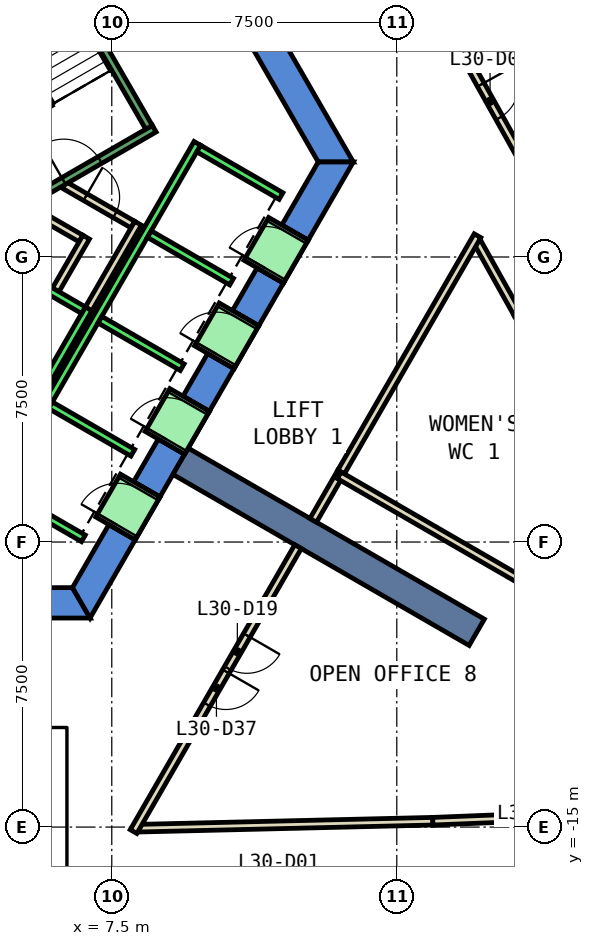
"""IFC4 building model, lengths in metres.
Left out: names, types, materials, properties, quantities, classifications, styles, units other than length and angle.
Written with IfcOpenShell. Run it as: python <this file> out.ifc"""

import sys

from ifc_helpers import new_model, si_unit, direction, frame, frame_2d, origin, place, context, subcontext, project, spatial, polyline, rectangle, outline, extrude, element, fill, save


model = new_model("IFC4")
c1 = context("Model", 3, precision=1e-05, world=origin(), true_north=direction((0.0, 1.0)))
c2 = subcontext(c1, "Body", "Model", "MODEL_VIEW")
j1 = project(units=[si_unit("LENGTHUNIT", "METRE"), si_unit("PLANEANGLEUNIT", "RADIAN")], contexts=[c1])
p1 = place(None, origin())
s1 = spatial("IfcSite", under=j1, at=p1, CompositionType="ELEMENT")
p2 = place(p1, origin())
s2 = spatial("IfcBuilding", under=s1, at=p2, CompositionType="ELEMENT")
p3 = place(p2, frame((0.0, 0.0, 138.2)))
s3 = spatial("IfcBuildingStorey", under=s2, at=p3, CompositionType="ELEMENT", Elevation=138.2)
p4 = place(p3, frame((0.0, 0.0, -0.6)))
e1 = element("IfcWall", 1, at=p4, inside=s3, PredefinedType="SHEAR", context=c2, shape_type="SweptSolid", body=[
    extrude(outline(polyline([(8.517, 11.748), (7.824, 11.348), (12.933, 2.5), (13.856, 2.5), (8.517, 11.748)])), origin(), (0.0, 0.0, 1.0), 4.4),
])
p5 = place(p3, frame((0.0, 0.0, -0.6)))
e2 = element("IfcWall", 2, at=p5, inside=s3, PredefinedType="SHEAR", context=c2, shape_type="SweptSolid", body=[
    extrude(outline(polyline([(5.75, -8.7), (5.75, -9.5), (6.928, -9.5), (6.466, -8.7), (5.75, -8.7)])), origin(), (0.0, 0.0, 1.0), 4.4),
])
p6 = place(p3, frame((0.0, 0.0, -0.6)))
e3 = element("IfcWall", 3, at=p6, inside=s3, PredefinedType="SHEAR", context=c2, shape_type="SweptSolid", body=[
    extrude(outline(polyline([(8.117, -7.44), (7.424, -7.04), (6.466, -8.7), (6.928, -9.5), (8.117, -7.44)])), origin(), (0.0, 0.0, 1.0), 4.4),
])
p7 = place(p3, frame((0.0, 0.0, -0.6)))
e4 = element("IfcWall", 4, at=p7, inside=s3, PredefinedType="SHEAR", context=c2, shape_type="SweptSolid", body=[
    extrude(outline(polyline([(9.417, -5.189), (8.724, -4.789), (8.075, -5.914), (8.767, -6.314), (9.417, -5.189)])), origin(), (0.0, 0.0, 1.0), 4.4),
])
p8 = place(p3, frame((0.0, 0.0, -0.6)))
e5 = element("IfcWall", 5, at=p8, inside=s3, PredefinedType="SHEAR", context=c2, shape_type="SweptSolid", body=[
    extrude(outline(polyline([(10.717, -2.937), (10.025, -2.537), (9.374, -3.663), (10.067, -4.063), (10.717, -2.937)])), origin(), (0.0, 0.0, 1.0), 4.4),
])
p9 = place(p3, frame((0.0, 0.0, -0.6)))
e6 = element("IfcWall", 6, at=p9, inside=s3, PredefinedType="SHEAR", context=c2, shape_type="SweptSolid", body=[
    extrude(outline(polyline([(12.017, -0.686), (11.324, -0.286), (10.675, -1.411), (11.367, -1.811), (12.017, -0.686)])), origin(), (0.0, 0.0, 1.0), 4.4),
])
p10 = place(p3, frame((0.0, 0.0, -0.6)))
e7 = element("IfcWall", 7, at=p10, inside=s3, PredefinedType="SHEAR", context=c2, shape_type="SweptSolid", body=[
    extrude(outline(polyline([(11.974, 0.84), (12.667, 0.44), (13.856, 2.5), (12.933, 2.5), (11.974, 0.84)])), origin(), (0.0, 0.0, 1.0), 4.4),
])
p11 = place(p3, frame((0.0, 0.0, 3.6)))
e8 = element("IfcWall", 8, at=p11, inside=s3, PredefinedType="SHEAR", context=c2, shape_type="SweptSolid", body=[
    extrude(outline(polyline([(8.767, -6.314), (8.075, -5.914), (7.424, -7.04), (8.117, -7.44), (8.767, -6.314)])), origin(), (0.0, 0.0, 1.0), 0.2),
])
p12 = place(p3, frame((0.0, 0.0, 3.6)))
e9 = element("IfcWall", 9, at=p12, inside=s3, PredefinedType="SHEAR", context=c2, shape_type="SweptSolid", body=[
    extrude(outline(polyline([(10.067, -4.063), (9.374, -3.663), (8.724, -4.789), (9.417, -5.189), (10.067, -4.063)])), origin(), (0.0, 0.0, 1.0), 0.2),
])
p13 = place(p3, frame((0.0, 0.0, 3.6)))
e10 = element("IfcWall", 10, at=p13, inside=s3, PredefinedType="SHEAR", context=c2, shape_type="SweptSolid", body=[
    extrude(outline(polyline([(11.367, -1.811), (10.675, -1.411), (10.025, -2.537), (10.717, -2.937), (11.367, -1.811)])), origin(), (0.0, 0.0, 1.0), 0.2),
])
p14 = place(p3, frame((0.0, 0.0, 3.6)))
e11 = element("IfcWall", 11, at=p14, inside=s3, PredefinedType="SHEAR", context=c2, shape_type="SweptSolid", body=[
    extrude(outline(polyline([(12.667, 0.44), (11.974, 0.84), (11.324, -0.286), (12.017, -0.686), (12.667, 0.44)])), origin(), (0.0, 0.0, 1.0), 0.2),
])
p15 = place(p3, frame((9.31, -5.375, -0.6), z_axis=(0.0, 0.0, 1.0), x_axis=(0.866017533419, -0.500013631625, 0.0)))
e12 = element("IfcWall", 12, at=p15, inside=s3, PredefinedType="SHEAR", context=c2, shape_type="SweptSolid", body=[
    extrude(rectangle(XDim=9.0, YDim=0.8, at=frame_2d((4.5, 0.0))), origin(), (0.0, 0.0, 1.0), 4.4),
])
p16 = place(p3, frame((8.223, -15.029, 0.0), z_axis=(0.0, 0.0, 1.0), x_axis=(0.99971920994, 0.023696018186, 0.0)))
e13 = element("IfcWall", 13, at=p16, inside=s3, PredefinedType="PARTITIONING", context=c2, shape_type="SweptSolid", body=[
    extrude(rectangle(XDim=7.727, YDim=0.2, at=frame_2d((3.864, 0.0))), origin(), (0.0, 0.0, 1.0), 3.8),
])
p17 = place(p3, frame((15.948, -14.846, 0.0), z_axis=(0.0, 0.0, 1.0), x_axis=(0.999208477774, 0.039779617206, 0.0)))
e14 = element("IfcWall", 14, at=p17, inside=s3, PredefinedType="PARTITIONING", context=c2, shape_type="SweptSolid", body=[
    extrude(rectangle(XDim=2.639, YDim=0.2, at=frame_2d((1.32, 0.0))), origin(), (0.0, 0.0, 1.0), 3.8),
])
p18 = place(p3, frame((18.178, -1.501, 0.0), z_axis=(0.0, 0.0, 1.0), x_axis=(-0.487980809747, 0.872854357449, 0.0)))
e15 = element("IfcWall", 15, at=p18, inside=s3, PredefinedType="PARTITIONING", context=c2, shape_type="SweptSolid", body=[
    extrude(rectangle(XDim=2.162, YDim=0.2, at=frame_2d((1.081, 0.0))), origin(), (0.0, 0.0, 1.0), 3.8),
])
p19 = place(p3, frame((16.624, 5.582, 0.0), z_axis=(0.0, 0.0, 1.0), x_axis=(0.487871212611, -0.872915620152, 0.0)))
e16 = element("IfcWall", 16, at=p19, inside=s3, PredefinedType="PARTITIONING", context=c2, shape_type="SweptSolid", body=[
    extrude(rectangle(XDim=3.402, YDim=0.2, at=frame_2d((1.701, 0.0))), origin(), (0.0, 0.0, 1.0), 3.8),
])
p20 = place(p19, frame((1.202, 0.0, 0.0)))
e17 = element("IfcOpeningElement", 17, at=p20, cuts=e16, PredefinedType="OPENING", context=c2, shape_type="SweptSolid", body=[
    extrude(rectangle(XDim=1.0, YDim=2.1, at=frame_2d((0.5, 1.05))), frame((0.0, 0.11, 0.0), z_axis=(0.0, -1.0, 0.0), x_axis=(1.0, 0.0, 0.0)), (0.0, 0.0, 1.0), 0.22),
])
p21 = place(p3, frame((5.499, 1.172, 0.0), z_axis=(0.0, 0.0, 1.0), x_axis=(0.866333505267, -0.499465972466, 0.0)))
e18 = element("IfcWall", 18, at=p21, inside=s3, PredefinedType="PARTITIONING", context=c2, shape_type="SweptSolid", body=[
    extrude(rectangle(XDim=1.374, YDim=0.2, at=frame_2d((0.687, 0.0))), origin(), (0.0, 0.0, 1.0), 3.8),
])
p22 = place(p3, frame((6.826, 0.522, 0.0), z_axis=(0.0, 0.0, 1.0), x_axis=(-0.500016722714, -0.866015748706, 0.0)))
e19 = element("IfcWall", 19, at=p22, inside=s3, PredefinedType="PARTITIONING", context=c2, shape_type="SweptSolid", body=[
    extrude(rectangle(XDim=1.7, YDim=0.2, at=frame_2d((0.85, 0.0))), origin(), (0.0, 0.0, 1.0), 3.8),
])
p23 = place(p3, frame((6.25, 1.894, 0.0), z_axis=(0.0, 0.0, 1.0), x_axis=(0.866043184279, -0.499969202016, 0.0)))
e20 = element("IfcWall", 20, at=p23, inside=s3, PredefinedType="PARTITIONING", context=c2, shape_type="SweptSolid", body=[
    extrude(rectangle(XDim=2.084, YDim=0.2, at=frame_2d((1.042, 0.0))), origin(), (0.0, 0.0, 1.0), 3.8),
])
p24 = place(p23, frame((0.642, 0.0, 0.0)))
e21 = element("IfcOpeningElement", 21, at=p24, cuts=e20, PredefinedType="OPENING", context=c2, shape_type="SweptSolid", body=[
    extrude(rectangle(XDim=0.9, YDim=2.1, at=frame_2d((0.45, 1.05))), frame((0.0, 0.11, 0.0), z_axis=(0.0, -1.0, 0.0), x_axis=(1.0, 0.0, 0.0)), (0.0, 0.0, 1.0), 0.22),
])
p25 = place(p3, frame((8.192, 0.888, 0.0), z_axis=(0.0, 0.0, 1.0), x_axis=(-0.499940625693, -0.866059680843, 0.0)))
e22 = element("IfcWall", 22, at=p25, inside=s3, PredefinedType="PARTITIONING", context=c2, shape_type="SweptSolid", body=[
    extrude(rectangle(XDim=2.68, YDim=0.2, at=frame_2d((1.34, 0.0))), origin(), (0.0, 0.0, 1.0), 3.8),
])
p26 = place(p3, frame((13.535, -5.657, 0.0), z_axis=(0.0, 0.0, 1.0), x_axis=(-0.499751238113, -0.866168978898, 0.0)))
e23 = element("IfcWall", 23, at=p26, inside=s3, PredefinedType="PARTITIONING", context=c2, shape_type="SweptSolid", body=[
    extrude(rectangle(XDim=1.469, YDim=0.2, at=frame_2d((0.734, 0.0))), origin(), (0.0, 0.0, 1.0), 3.8),
])
p27 = place(p3, frame((17.124, 0.56, 0.0), z_axis=(0.0, 0.0, 1.0), x_axis=(-0.49996876383, -0.866043437245, 0.0)))
e24 = element("IfcWall", 24, at=p27, inside=s3, PredefinedType="PARTITIONING", context=c2, shape_type="SweptSolid", body=[
    extrude(rectangle(XDim=7.179, YDim=0.2, at=frame_2d((3.589, 0.0))), origin(), (0.0, 0.0, 1.0), 3.8),
])
p28 = place(p3, frame((13.485, -5.744, 0.0), z_axis=(0.0, 0.0, 1.0), x_axis=(0.865950545648, -0.500129635687, 0.0)))
e25 = element("IfcWall", 25, at=p28, inside=s3, PredefinedType="PARTITIONING", context=c2, shape_type="SweptSolid", body=[
    extrude(rectangle(XDim=9.1, YDim=0.2, at=frame_2d((4.55, 0.0))), origin(), (0.0, 0.0, 1.0), 3.8),
])
p29 = place(p3, frame((12.401, -7.621, 0.0), z_axis=(0.0, 0.0, 1.0), x_axis=(-0.499964151829, -0.866046099747, 0.0)))
e26 = element("IfcWall", 26, at=p29, inside=s3, PredefinedType="PARTITIONING", context=c2, shape_type="SweptSolid", body=[
    extrude(rectangle(XDim=8.656, YDim=0.2, at=frame_2d((4.328, 0.0))), origin(), (0.0, 0.0, 1.0), 3.8),
])
p30 = place(p29, frame((2.694, 0.0, 0.0)))
e27 = element("IfcOpeningElement", 27, at=p30, cuts=e26, PredefinedType="OPENING", context=c2, shape_type="SweptSolid", body=[
    extrude(rectangle(XDim=1.0, YDim=2.1, at=frame_2d((0.5, 1.05))), frame((0.0, 0.11, 0.0), z_axis=(0.0, -1.0, 0.0), x_axis=(1.0, 0.0, 0.0)), (0.0, 0.0, 1.0), 0.22),
])
p31 = place(p29, frame((3.794, 0.0, 0.0)))
e28 = element("IfcOpeningElement", 28, at=p31, cuts=e26, PredefinedType="OPENING", context=c2, shape_type="SweptSolid", body=[
    extrude(rectangle(XDim=1.0, YDim=2.1, at=frame_2d((0.5, 1.05))), frame((0.0, 0.11, 0.0), z_axis=(0.0, -1.0, 0.0), x_axis=(1.0, 0.0, 0.0)), (0.0, 0.0, 1.0), 0.22),
])
p32 = place(p3, frame((5.492, -3.788, 0.0), z_axis=(0.0, 0.0, 1.0), x_axis=(0.500011755427, 0.866018616679, 0.0)))
e29 = element("IfcWall", 29, at=p32, inside=s3, PredefinedType="STANDARD", context=c2, shape_type="SweptSolid", body=[
    extrude(rectangle(XDim=2.8, YDim=0.2, at=frame_2d((1.4, 0.0))), origin(), (0.0, 0.0, 1.0), 3.8),
])
p33 = place(p3, frame((4.677, -0.2, 0.0), z_axis=(0.0, 0.0, 1.0), x_axis=(0.865973769406, -0.500089422704, 0.0)))
e30 = element("IfcWall", 30, at=p33, inside=s3, PredefinedType="STANDARD", context=c2, shape_type="SweptSolid", body=[
    extrude(rectangle(XDim=2.399, YDim=0.2, at=frame_2d((1.2, 0.0))), origin(), (0.0, 0.0, 1.0), 3.8),
])
p34 = place(p3, frame((4.451, -6.19, 0.0), z_axis=(0.0, 0.0, 1.0), x_axis=(0.50000090737, 0.866024879913, 0.0)))
e31 = element("IfcWall", 31, at=p34, inside=s3, PredefinedType="STANDARD", context=c2, shape_type="SweptSolid", body=[
    extrude(rectangle(XDim=10.6, YDim=0.2, at=frame_2d((5.3, 0.0))), origin(), (0.0, 0.0, 1.0), 3.8),
])
for number, where, z_axis, x_axis in (
    (32, (4.588, -6.153, 0.0), (0.0, 0.0, 1.0), (0.866, -0.5, 0.0)),
    (33, (5.888, -3.902, 0.0), (0.0, 0.0, 1.0), (0.866, -0.5, 0.0)),
    (34, (7.188, -1.65, 0.0), (0.0, 0.0, 1.0), (0.866, -0.5, 0.0)),
    (35, (8.488, 0.602, 0.0), (0.0, 0.0, 1.0), (0.866, -0.5, 0.0)),
):
    element("IfcWall", number, at=place(p3, frame(where, z_axis=z_axis, x_axis=x_axis)), inside=s3, PredefinedType="STANDARD", context=c2, shape_type="SweptSolid", body=[
        extrude(rectangle(XDim=2.5, YDim=0.2, at=frame_2d((1.25, 0.0))), origin(), (0.0, 0.0, 1.0), 3.8),
    ])
p35 = place(p3, frame((9.788, 2.853, 0.0), z_axis=(0.0, 0.0, 1.0), x_axis=(0.865998541277, -0.500046524342, 0.0)))
e36 = element("IfcWall", 36, at=p35, inside=s3, PredefinedType="STANDARD", context=c2, shape_type="SweptSolid", body=[
    extrude(rectangle(XDim=2.5, YDim=0.2, at=frame_2d((1.25, 0.0))), origin(), (0.0, 0.0, 1.0), 3.8),
])
p36 = place(p3, frame((7.598, -7.14, 0.0), z_axis=(0.0, 0.0, 1.0), x_axis=(0.500362116554, 0.865816234728, 0.0)))
e37 = element("IfcWall", 37, at=p36, inside=s3, PredefinedType="STANDARD", context=c2, shape_type="SweptSolid", body=[
    extrude(rectangle(XDim=1.299, YDim=1.2, at=frame_2d((0.65, 0.0))), origin(), (0.0, 0.0, 1.0), 2.4),
])
p37 = place(p36, frame((0.1, 0.0, 0.0)))
e38 = element("IfcOpeningElement", 38, at=p37, cuts=e37, PredefinedType="OPENING", context=c2, shape_type="SweptSolid", body=[
    extrude(rectangle(XDim=1.1, YDim=2.3, at=frame_2d((0.55, 1.15))), frame((0.0, 0.61, 0.0), z_axis=(0.0, -1.0, 0.0), x_axis=(1.0, 0.0, 0.0)), (0.0, 0.0, 1.0), 1.22),
])
p38 = place(p3, frame((8.898, -4.889, 0.0), z_axis=(0.0, 0.0, 1.0), x_axis=(0.500036693733, 0.866004217611, 0.0)))
e39 = element("IfcWall", 39, at=p38, inside=s3, PredefinedType="STANDARD", context=c2, shape_type="SweptSolid", body=[
    extrude(rectangle(XDim=1.3, YDim=1.2, at=frame_2d((0.65, 0.0))), origin(), (0.0, 0.0, 1.0), 2.4),
])
p39 = place(p38, frame((0.1, 0.0, 0.0)))
e40 = element("IfcOpeningElement", 40, at=p39, cuts=e39, PredefinedType="OPENING", context=c2, shape_type="SweptSolid", body=[
    extrude(rectangle(XDim=1.1, YDim=2.3, at=frame_2d((0.55, 1.15))), frame((0.0, 0.61, 0.0), z_axis=(0.0, -1.0, 0.0), x_axis=(1.0, 0.0, 0.0)), (0.0, 0.0, 1.0), 1.22),
])
p40 = place(p3, frame((10.198, -2.637, 0.0), z_axis=(0.0, 0.0, 1.0), x_axis=(0.49989585183, 0.866085525409, 0.0)))
e41 = element("IfcWall", 41, at=p40, inside=s3, PredefinedType="STANDARD", context=c2, shape_type="SweptSolid", body=[
    extrude(rectangle(XDim=1.3, YDim=1.2, at=frame_2d((0.65, 0.0))), origin(), (0.0, 0.0, 1.0), 2.4),
])
p41 = place(p40, frame((0.1, 0.0, 0.0)))
e42 = element("IfcOpeningElement", 42, at=p41, cuts=e41, PredefinedType="OPENING", context=c2, shape_type="SweptSolid", body=[
    extrude(rectangle(XDim=1.1, YDim=2.3, at=frame_2d((0.55, 1.15))), frame((0.0, 0.61, 0.0), z_axis=(0.0, -1.0, 0.0), x_axis=(1.0, 0.0, 0.0)), (0.0, 0.0, 1.0), 1.22),
])
p42 = place(p3, frame((11.498, -0.385, 0.0), z_axis=(0.0, 0.0, 1.0), x_axis=(0.500221244143, 0.865897630733, 0.0)))
e43 = element("IfcWall", 43, at=p42, inside=s3, PredefinedType="STANDARD", context=c2, shape_type="SweptSolid", body=[
    extrude(rectangle(XDim=1.299, YDim=1.2, at=frame_2d((0.65, 0.0))), origin(), (0.0, 0.0, 1.0), 2.4),
])
p43 = place(p42, frame((0.1, 0.0, 0.0)))
e44 = element("IfcOpeningElement", 44, at=p43, cuts=e43, PredefinedType="OPENING", context=c2, shape_type="SweptSolid", body=[
    extrude(rectangle(XDim=1.1, YDim=2.3, at=frame_2d((0.55, 1.15))), frame((0.0, 0.61, 0.0), z_axis=(0.0, -1.0, 0.0), x_axis=(1.0, 0.0, 0.0)), (0.0, 0.0, 1.0), 1.22),
])
p44 = place(p3, frame((4.806, 1.176, 0.0), z_axis=(0.0, 0.0, 1.0), x_axis=(0.866059941101, 0.499940174841, 0.0)))
e45 = element("IfcWall", 45, at=p44, inside=s3, PredefinedType="STANDARD", context=c2, shape_type="SweptSolid", body=[
    extrude(rectangle(XDim=4.4, YDim=0.2, at=frame_2d((2.2, 0.0))), origin(), (0.0, 0.0, 1.0), 3.8),
])
p45 = place(p44, frame((1.65, 0.0, 0.0)))
e46 = element("IfcOpeningElement", 46, at=p45, cuts=e45, PredefinedType="OPENING", context=c2, shape_type="SweptSolid", body=[
    extrude(rectangle(XDim=1.1, YDim=2.2, at=frame_2d((0.55, 1.1))), frame((0.0, 0.11, 0.0), z_axis=(0.0, -1.0, 0.0), x_axis=(1.0, 0.0, 0.0)), (0.0, 0.0, 1.0), 0.22),
])
p46 = place(p3, frame((8.48, 3.412, 0.0), z_axis=(0.0, 0.0, 1.0), x_axis=(-0.499978703459, 0.866037698999, 0.0)))
e47 = element("IfcWall", 47, at=p46, inside=s3, PredefinedType="STANDARD", context=c2, shape_type="SweptSolid", body=[
    extrude(rectangle(XDim=6.9, YDim=0.2, at=frame_2d((3.45, 0.0))), origin(), (0.0, 0.0, 1.0), 3.8),
])
p47 = place(p20, origin())
e48 = element("IfcDoor", 48, at=p47, inside=s3, OperationType="SINGLE_SWING_LEFT", PredefinedType="DOOR", context=c2, shape_type="SweptSolid", body=[
    extrude(rectangle(XDim=1.0, YDim=2.1, at=frame_2d((0.5, 1.05))), frame((0.0, 0.025, 0.0), z_axis=(0.0, -1.0, 0.0), x_axis=(1.0, 0.0, 0.0)), (0.0, 0.0, 1.0), 0.05),
])
fill(e17, e48)
p48 = place(p30, origin())
e49 = element("IfcDoor", 49, at=p48, inside=s3, OperationType="SINGLE_SWING_LEFT", PredefinedType="DOOR", context=c2, shape_type="SweptSolid", body=[
    extrude(rectangle(XDim=1.0, YDim=2.1, at=frame_2d((0.5, 1.05))), frame((0.0, 0.025, 0.0), z_axis=(0.0, -1.0, 0.0), x_axis=(1.0, 0.0, 0.0)), (0.0, 0.0, 1.0), 0.05),
])
fill(e27, e49)
p49 = place(p24, origin())
e50 = element("IfcDoor", 50, at=p49, inside=s3, OperationType="SINGLE_SWING_LEFT", PredefinedType="DOOR", context=c2, shape_type="SweptSolid", body=[
    extrude(rectangle(XDim=0.9, YDim=2.1, at=frame_2d((0.45, 1.05))), frame((0.0, 0.025, 0.0), z_axis=(0.0, -1.0, 0.0), x_axis=(1.0, 0.0, 0.0)), (0.0, 0.0, 1.0), 0.05),
])
fill(e21, e50)
p50 = place(p31, origin())
e51 = element("IfcDoor", 51, at=p50, inside=s3, OperationType="SINGLE_SWING_RIGHT", PredefinedType="DOOR", context=c2, shape_type="SweptSolid", body=[
    extrude(rectangle(XDim=1.0, YDim=2.1, at=frame_2d((0.5, 1.05))), frame((0.0, 0.025, 0.0), z_axis=(0.0, -1.0, 0.0), x_axis=(1.0, 0.0, 0.0)), (0.0, 0.0, 1.0), 0.05),
])
fill(e28, e51)
p51 = place(p37, origin())
e52 = element("IfcDoor", 52, at=p51, inside=s3, OperationType="SLIDING_TO_LEFT", PredefinedType="DOOR", context=c2, shape_type="SweptSolid", body=[
    extrude(rectangle(XDim=1.1, YDim=2.3, at=frame_2d((0.55, 1.15))), frame((0.0, 0.025, 0.0), z_axis=(0.0, -1.0, 0.0), x_axis=(1.0, 0.0, 0.0)), (0.0, 0.0, 1.0), 0.05),
])
fill(e38, e52)
p52 = place(p39, origin())
e53 = element("IfcDoor", 53, at=p52, inside=s3, OperationType="SLIDING_TO_LEFT", PredefinedType="DOOR", context=c2, shape_type="SweptSolid", body=[
    extrude(rectangle(XDim=1.1, YDim=2.3, at=frame_2d((0.55, 1.15))), frame((0.0, 0.025, 0.0), z_axis=(0.0, -1.0, 0.0), x_axis=(1.0, 0.0, 0.0)), (0.0, 0.0, 1.0), 0.05),
])
fill(e40, e53)
p53 = place(p41, origin())
e54 = element("IfcDoor", 54, at=p53, inside=s3, OperationType="SLIDING_TO_LEFT", PredefinedType="DOOR", context=c2, shape_type="SweptSolid", body=[
    extrude(rectangle(XDim=1.1, YDim=2.3, at=frame_2d((0.55, 1.15))), frame((0.0, 0.025, 0.0), z_axis=(0.0, -1.0, 0.0), x_axis=(1.0, 0.0, 0.0)), (0.0, 0.0, 1.0), 0.05),
])
fill(e42, e54)
p54 = place(p43, origin())
e55 = element("IfcDoor", 55, at=p54, inside=s3, OperationType="SLIDING_TO_LEFT", PredefinedType="DOOR", context=c2, shape_type="SweptSolid", body=[
    extrude(rectangle(XDim=1.1, YDim=2.3, at=frame_2d((0.55, 1.15))), frame((0.0, 0.025, 0.0), z_axis=(0.0, -1.0, 0.0), x_axis=(1.0, 0.0, 0.0)), (0.0, 0.0, 1.0), 0.05),
])
fill(e44, e55)
p55 = place(p45, origin())
e56 = element("IfcDoor", 56, at=p55, inside=s3, OperationType="SINGLE_SWING_LEFT", PredefinedType="DOOR", context=c2, shape_type="SweptSolid", body=[
    extrude(rectangle(XDim=1.1, YDim=2.2, at=frame_2d((0.55, 1.1))), frame((0.0, 0.025, 0.0), z_axis=(0.0, -1.0, 0.0), x_axis=(1.0, 0.0, 0.0)), (0.0, 0.0, 1.0), 0.05),
])
fill(e46, e56)
save(model, sys.argv[1])
